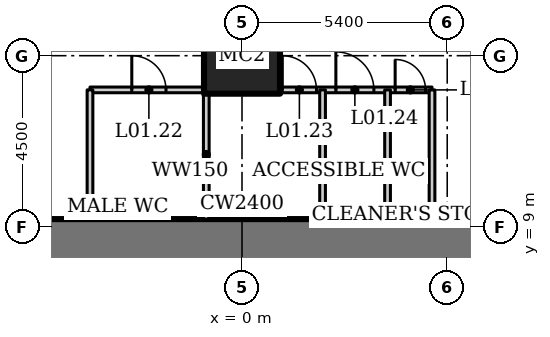
"""IFC4 building model, lengths in metres.
Left out: names, types, materials, properties, quantities, classifications, styles, units other than length and angle.
Written with IfcOpenShell. Run it as: python <this file> out.ifc"""

import sys

from ifc_helpers import new_model, si_unit, direction, frame, frame_2d, origin, origin_2d, place, context, subcontext, project, spatial, rectangle, hollow_rectangle, extrude, element, fill, save


model = new_model("IFC4")
c1 = context("Model", 3, precision=1e-05, world=origin(), true_north=direction((0.0, 1.0)))
c2 = subcontext(c1, "Body", "Model", "MODEL_VIEW")
j1 = project(units=[si_unit("LENGTHUNIT", "METRE"), si_unit("PLANEANGLEUNIT", "RADIAN")], contexts=[c1])
p1 = place(None, origin())
s1 = spatial("IfcSite", under=j1, at=p1, CompositionType="ELEMENT")
p2 = place(p1, origin())
s2 = spatial("IfcBuilding", under=s1, at=p2, CompositionType="ELEMENT")
p3 = place(p2, frame((0.0, 0.0, 6.5)))
s3 = spatial("IfcBuildingStorey", under=s2, at=p3, CompositionType="ELEMENT", Elevation=6.5)
p4 = place(p3, frame((0.0, 13.5, 0.0), z_axis=(0.0, 0.0, 1.0), x_axis=(1.0, 0.0, 0.0)))
e1 = element("IfcColumn", 1, at=p4, inside=s3, PredefinedType="COLUMN", context=c2, shape_type="SweptSolid", body=[
    extrude(hollow_rectangle(XDim=2.0, YDim=2.0, WallThickness=0.17, at=origin_2d()), origin(), (0.0, 0.0, 1.0), 8.0),
])
p5 = place(p3, frame((12.2, 8.0, 0.0), z_axis=(0.0, 0.0, 1.0), x_axis=(-1.0, 0.0, 0.0)))
e2 = element("IfcWall", 2, at=p5, inside=s3, PredefinedType="SHEAR", context=c2, shape_type="SweptSolid", body=[
    extrude(rectangle(XDim=24.4, YDim=2.4, at=frame_2d((12.2, 0.0))), origin(), (0.0, 0.0, 1.0), 8.0),
])
p6 = place(p3, frame((-4.0, 12.6, 0.0), z_axis=(0.0, 0.0, 1.0), x_axis=(1.0, 0.0, 0.0)))
e3 = element("IfcWall", 3, at=p6, inside=s3, PredefinedType="SOLIDWALL", context=c2, shape_type="SweptSolid", body=[
    extrude(rectangle(XDim=9.0, YDim=0.15, at=frame_2d((4.5, 0.0))), origin(), (0.0, 0.0, 1.0), 7.8),
])
p7 = place(p6, frame((1.1, 0.0, 0.0)))
e4 = element("IfcOpeningElement", 4, at=p7, cuts=e3, PredefinedType="OPENING", context=c2, shape_type="SweptSolid", body=[
    extrude(rectangle(XDim=0.9, YDim=2.1, at=frame_2d((0.45, 1.05))), frame((0.0, 0.085, 0.0), z_axis=(0.0, -1.0, 0.0), x_axis=(1.0, 0.0, 0.0)), (0.0, 0.0, 1.0), 0.17),
])
p8 = place(p6, frame((5.06, 0.0, 0.0)))
e5 = element("IfcOpeningElement", 5, at=p8, cuts=e3, PredefinedType="OPENING", context=c2, shape_type="SweptSolid", body=[
    extrude(rectangle(XDim=0.9, YDim=2.1, at=frame_2d((0.45, 1.05))), frame((0.0, 0.085, 0.0), z_axis=(0.0, -1.0, 0.0), x_axis=(1.0, 0.0, 0.0)), (0.0, 0.0, 1.0), 0.17),
])
p9 = place(p6, frame((6.47, 0.0, 0.0)))
e6 = element("IfcOpeningElement", 6, at=p9, cuts=e3, PredefinedType="OPENING", context=c2, shape_type="SweptSolid", body=[
    extrude(rectangle(XDim=1.0, YDim=2.1, at=frame_2d((0.5, 1.05))), frame((0.0, 0.085, 0.0), z_axis=(0.0, -1.0, 0.0), x_axis=(1.0, 0.0, 0.0)), (0.0, 0.0, 1.0), 0.17),
])
p10 = place(p6, frame((8.03, 0.0, 0.0)))
e7 = element("IfcOpeningElement", 7, at=p10, cuts=e3, PredefinedType="OPENING", context=c2, shape_type="SweptSolid", body=[
    extrude(rectangle(XDim=0.8, YDim=2.1, at=frame_2d((0.4, 1.05))), frame((0.0, 0.085, 0.0), z_axis=(0.0, -1.0, 0.0), x_axis=(1.0, 0.0, 0.0)), (0.0, 0.0, 1.0), 0.17),
])
for number, where, z_axis, x_axis in (
    (8, (-4.0, 9.2, 0.0), (0.0, 0.0, 1.0), (0.0, 1.0, 0.0)),
    (9, (5.0, 9.2, 0.0), (0.0, 0.0, 1.0), (0.0, 1.0, 0.0)),
    (10, (-0.94, 9.2, 0.0), (0.0, 0.0, 1.0), (0.0, 1.0, 0.0)),
):
    element("IfcWall", number, at=place(p3, frame(where, z_axis=z_axis, x_axis=x_axis)), inside=s3, PredefinedType="SOLIDWALL", context=c2, shape_type="SweptSolid", body=[
        extrude(rectangle(XDim=3.4, YDim=0.15, at=frame_2d((1.7, 0.0))), origin(), (0.0, 0.0, 1.0), 7.8),
    ])
p11 = place(p3, frame((2.12, 9.2, 0.0), z_axis=(0.0, 0.0, 1.0), x_axis=(0.0, 1.0, 0.0)))
e11 = element("IfcWall", 11, at=p11, inside=s3, PredefinedType="SOLIDWALL", context=c2, shape_type="SweptSolid", body=[
    extrude(rectangle(XDim=3.4, YDim=0.15, at=frame_2d((1.7, 0.0))), origin(), (0.0, 0.0, 1.0), 6.3),
])
p12 = place(p3, frame((3.83, 9.2, 0.0), z_axis=(0.0, 0.0, 1.0), x_axis=(0.0, 1.0, 0.0)))
e12 = element("IfcWall", 12, at=p12, inside=s3, PredefinedType="SOLIDWALL", context=c2, shape_type="SweptSolid", body=[
    extrude(rectangle(XDim=3.4, YDim=0.15, at=frame_2d((1.7, 0.0))), origin(), (0.0, 0.0, 1.0), 7.8),
])
p13 = place(p7, origin())
e13 = element("IfcDoor", 13, at=p13, inside=s3, OperationType="SINGLE_SWING_LEFT", PredefinedType="DOOR", context=c2, shape_type="SweptSolid", body=[
    extrude(rectangle(XDim=0.9, YDim=2.1, at=frame_2d((0.45, 1.05))), frame((0.0, 0.025, 0.0), z_axis=(0.0, -1.0, 0.0), x_axis=(1.0, 0.0, 0.0)), (0.0, 0.0, 1.0), 0.05),
])
fill(e4, e13)
p14 = place(p8, origin())
e14 = element("IfcDoor", 14, at=p14, inside=s3, OperationType="SINGLE_SWING_LEFT", PredefinedType="DOOR", context=c2, shape_type="SweptSolid", body=[
    extrude(rectangle(XDim=0.9, YDim=2.1, at=frame_2d((0.45, 1.05))), frame((0.0, 0.025, 0.0), z_axis=(0.0, -1.0, 0.0), x_axis=(1.0, 0.0, 0.0)), (0.0, 0.0, 1.0), 0.05),
])
fill(e5, e14)
p15 = place(p9, origin())
e15 = element("IfcDoor", 15, at=p15, inside=s3, OperationType="SINGLE_SWING_LEFT", PredefinedType="DOOR", context=c2, shape_type="SweptSolid", body=[
    extrude(rectangle(XDim=1.0, YDim=2.1, at=frame_2d((0.5, 1.05))), frame((0.0, 0.025, 0.0), z_axis=(0.0, -1.0, 0.0), x_axis=(1.0, 0.0, 0.0)), (0.0, 0.0, 1.0), 0.05),
])
fill(e6, e15)
p16 = place(p10, origin())
e16 = element("IfcDoor", 16, at=p16, inside=s3, OperationType="SINGLE_SWING_LEFT", PredefinedType="DOOR", context=c2, shape_type="SweptSolid", body=[
    extrude(rectangle(XDim=0.8, YDim=2.1, at=frame_2d((0.4, 1.05))), frame((0.0, 0.025, 0.0), z_axis=(0.0, -1.0, 0.0), x_axis=(1.0, 0.0, 0.0)), (0.0, 0.0, 1.0), 0.05),
])
fill(e7, e16)
save(model, sys.argv[1])
